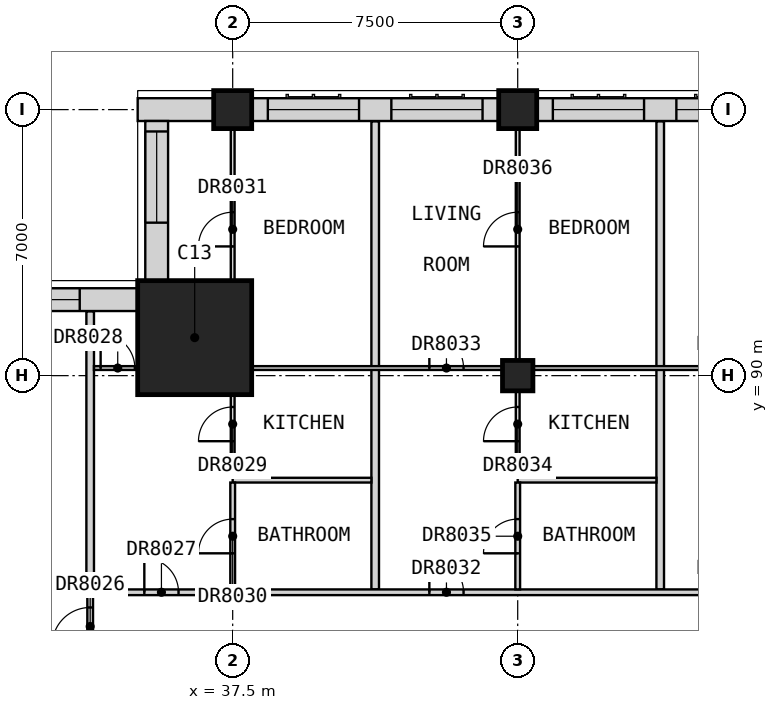
"""IFC4 building model, lengths in metres.
Left out: names, types, materials, properties, quantities, classifications, styles, units other than length and angle.
Written with IfcOpenShell. Run it as: python <this file> out.ifc"""

import sys

from ifc_helpers import new_model, si_unit, direction, frame, frame_2d, origin, origin_2d, place, context, subcontext, project, spatial, rectangle, extrude, element, fill, save


model = new_model("IFC4")
c1 = context("Model", 3, precision=1e-05, world=origin(), true_north=direction((0.0, 1.0)))
c2 = subcontext(c1, "Body", "Model", "MODEL_VIEW")
j1 = project(units=[si_unit("LENGTHUNIT", "METRE"), si_unit("PLANEANGLEUNIT", "RADIAN")], contexts=[c1])
p1 = place(None, origin())
s1 = spatial("IfcSite", under=j1, at=p1, CompositionType="ELEMENT")
p2 = place(p1, origin())
s2 = spatial("IfcBuilding", under=s1, at=p2, CompositionType="ELEMENT")
p3 = place(p2, frame((0.0, 0.0, 233.7)))
s3 = spatial("IfcBuildingStorey", under=s2, at=p3, CompositionType="ELEMENT", Elevation=233.7)
p4 = place(p3, frame((37.5, 97.0, 0.0), z_axis=(0.0, 0.0, 1.0), x_axis=(1.0, 0.0, 0.0)))
e1 = element("IfcColumn", 1, at=p4, inside=s3, PredefinedType="COLUMN", context=c2, shape_type="SweptSolid", body=[
    extrude(rectangle(XDim=1.0, YDim=1.0, at=origin_2d()), origin(), (0.0, 0.0, 1.0), 3.5),
])
p5 = place(p3, frame((45.0, 90.0, 0.0), z_axis=(0.0, 0.0, 1.0), x_axis=(1.0, 0.0, 0.0)))
e2 = element("IfcColumn", 2, at=p5, inside=s3, PredefinedType="COLUMN", context=c2, shape_type="SweptSolid", body=[
    extrude(rectangle(XDim=0.8, YDim=0.8, at=origin_2d()), origin(), (0.0, 0.0, 1.0), 3.5),
])
p6 = place(p3, frame((45.0, 97.0, 0.0), z_axis=(0.0, 0.0, 1.0), x_axis=(1.0, 0.0, 0.0)))
e3 = element("IfcColumn", 3, at=p6, inside=s3, PredefinedType="COLUMN", context=c2, shape_type="SweptSolid", body=[
    extrude(rectangle(XDim=1.0, YDim=1.0, at=origin_2d()), origin(), (0.0, 0.0, 1.0), 3.5),
])
p7 = place(p3, frame((36.5, 91.0, 0.0), z_axis=(0.0, 0.0, 1.0), x_axis=(1.0, 0.0, 0.0)))
e4 = element("IfcColumn", 4, at=p7, inside=s3, PredefinedType="COLUMN", context=c2, shape_type="SweptSolid", body=[
    extrude(rectangle(XDim=3.0, YDim=3.0, at=origin_2d()), origin(), (0.0, 0.0, 1.0), 3.5),
])
p8 = place(p3, frame((52.0, 97.0, 0.0), z_axis=(0.0, 0.0, 1.0), x_axis=(-1.0, 0.0, 0.0)))
e5 = element("IfcWall", 5, at=p8, inside=s3, PredefinedType="SOLIDWALL", context=c2, shape_type="SweptSolid", body=[
    extrude(rectangle(XDim=6.5, YDim=0.6, at=frame_2d((3.25, 0.0))), origin(), (0.0, 0.0, 1.0), 2.75),
])
p9 = place(p8, frame((3.675, 0.0, 0.8)))
e6 = element("IfcOpeningElement", 6, at=p9, cuts=e5, PredefinedType="OPENING", context=c2, shape_type="SweptSolid", body=[
    extrude(rectangle(XDim=2.4, YDim=1.8, at=frame_2d((1.2, 0.9))), frame((0.0, 0.31, 0.0), z_axis=(0.0, -1.0, 0.0), x_axis=(1.0, 0.0, 0.0)), (0.0, 0.0, 1.0), 0.62),
])
p10 = place(p8, frame((0.425, 0.0, 0.8)))
e7 = element("IfcOpeningElement", 7, at=p10, cuts=e5, PredefinedType="OPENING", context=c2, shape_type="SweptSolid", body=[
    extrude(rectangle(XDim=2.4, YDim=1.8, at=frame_2d((1.2, 0.9))), frame((0.0, 0.31, 0.0), z_axis=(0.0, -1.0, 0.0), x_axis=(1.0, 0.0, 0.0)), (0.0, 0.0, 1.0), 0.62),
])
p11 = place(p3, frame((44.5, 97.0, 0.0), z_axis=(0.0, 0.0, 1.0), x_axis=(-1.0, 0.0, 0.0)))
e8 = element("IfcWall", 8, at=p11, inside=s3, PredefinedType="SOLIDWALL", context=c2, shape_type="SweptSolid", body=[
    extrude(rectangle(XDim=6.5, YDim=0.6, at=frame_2d((3.25, 0.0))), origin(), (0.0, 0.0, 1.0), 2.75),
])
p12 = place(p11, frame((3.675, 0.0, 0.8)))
e9 = element("IfcOpeningElement", 9, at=p12, cuts=e8, PredefinedType="OPENING", context=c2, shape_type="SweptSolid", body=[
    extrude(rectangle(XDim=2.4, YDim=1.8, at=frame_2d((1.2, 0.9))), frame((0.0, 0.31, 0.0), z_axis=(0.0, -1.0, 0.0), x_axis=(1.0, 0.0, 0.0)), (0.0, 0.0, 1.0), 0.62),
])
p13 = place(p11, frame((0.425, 0.0, 0.8)))
e10 = element("IfcOpeningElement", 10, at=p13, cuts=e8, PredefinedType="OPENING", context=c2, shape_type="SweptSolid", body=[
    extrude(rectangle(XDim=2.4, YDim=1.8, at=frame_2d((1.2, 0.9))), frame((0.0, 0.31, 0.0), z_axis=(0.0, -1.0, 0.0), x_axis=(1.0, 0.0, 0.0)), (0.0, 0.0, 1.0), 0.62),
])
p14 = place(p3, frame((37.0, 97.0, 0.0), z_axis=(0.0, 0.0, 1.0), x_axis=(-1.0, 0.0, 0.0)))
e11 = element("IfcWall", 11, at=p14, inside=s3, PredefinedType="SOLIDWALL", context=c2, shape_type="SweptSolid", body=[
    extrude(rectangle(XDim=2.0, YDim=0.6, at=frame_2d((1.0, 0.0))), origin(), (0.0, 0.0, 1.0), 3.25),
])
p15 = place(p3, frame((35.5, 96.7, 0.0), z_axis=(0.0, 0.0, 1.0), x_axis=(0.0, -1.0, 0.0)))
e12 = element("IfcWall", 12, at=p15, inside=s3, PredefinedType="SOLIDWALL", context=c2, shape_type="SweptSolid", body=[
    extrude(rectangle(XDim=4.2, YDim=0.6, at=frame_2d((2.1, 0.0))), origin(), (0.0, 0.0, 1.0), 3.25),
])
p16 = place(p15, frame((0.275, 0.0, 0.8)))
e13 = element("IfcOpeningElement", 13, at=p16, cuts=e12, PredefinedType="OPENING", context=c2, shape_type="SweptSolid", body=[
    extrude(rectangle(XDim=2.4, YDim=1.8, at=frame_2d((1.2, 0.9))), frame((0.0, 0.31, 0.0), z_axis=(0.0, -1.0, 0.0), x_axis=(1.0, 0.0, 0.0)), (0.0, 0.0, 1.0), 0.62),
])
p17 = place(p3, frame((35.0, 92.0, 0.0), z_axis=(0.0, 0.0, 1.0), x_axis=(-1.0, 0.0, 0.0)))
e14 = element("IfcWall", 14, at=p17, inside=s3, PredefinedType="SOLIDWALL", context=c2, shape_type="SweptSolid", body=[
    extrude(rectangle(XDim=4.2, YDim=0.6, at=frame_2d((2.1, 0.0))), origin(), (0.0, 0.0, 1.0), 3.25),
])
p18 = place(p17, frame((1.525, 0.0, 0.8)))
e15 = element("IfcOpeningElement", 15, at=p18, cuts=e14, PredefinedType="OPENING", context=c2, shape_type="SweptSolid", body=[
    extrude(rectangle(XDim=2.4, YDim=1.8, at=frame_2d((1.2, 0.9))), frame((0.0, 0.31, 0.0), z_axis=(0.0, -1.0, 0.0), x_axis=(1.0, 0.0, 0.0)), (0.0, 0.0, 1.0), 0.62),
])
p19 = place(p3, frame((33.75, 84.3, 0.0), z_axis=(0.0, 0.0, 1.0), x_axis=(0.0, 1.0, 0.0)))
e16 = element("IfcWall", 16, at=p19, inside=s3, PredefinedType="PARTITIONING", context=c2, shape_type="SweptSolid", body=[
    extrude(rectangle(XDim=7.39, YDim=0.2, at=frame_2d((3.695, 0.0))), origin(), (0.0, 0.0, 1.0), 3.25),
])
for number, where, z_axis, x_axis in (
    (17, (41.25, 84.375, 0.0), (0.0, 0.0, 1.0), (0.0, 1.0, 0.0)),
    (18, (48.75, 84.375, 0.0), (0.0, 0.0, 1.0), (0.0, 1.0, 0.0)),
):
    element("IfcWall", number, at=place(p3, frame(where, z_axis=z_axis, x_axis=x_axis)), inside=s3, PredefinedType="PARTITIONING", context=c2, shape_type="SweptSolid", body=[
        extrude(rectangle(XDim=12.315, YDim=0.2, at=frame_2d((6.157, 0.0))), origin(), (0.0, 0.0, 1.0), 3.25),
    ])
p20 = place(p3, frame((33.85, 84.3, 0.0), z_axis=(0.0, 0.0, 1.0), x_axis=(1.0, 0.0, 0.0)))
e19 = element("IfcWall", 19, at=p20, inside=s3, PredefinedType="PARTITIONING", context=c2, shape_type="SweptSolid", body=[
    extrude(rectangle(XDim=27.95, YDim=0.15, at=frame_2d((13.975, 0.0))), origin(), (0.0, 0.0, 1.0), 3.25),
])
p21 = place(p20, frame((1.325, 0.0, 0.0)))
e20 = element("IfcOpeningElement", 20, at=p21, cuts=e19, PredefinedType="OPENING", context=c2, shape_type="SweptSolid", body=[
    extrude(rectangle(XDim=0.9, YDim=2.1, at=frame_2d((0.45, 1.05))), frame((0.0, 0.085, 0.0), z_axis=(0.0, -1.0, 0.0), x_axis=(1.0, 0.0, 0.0)), (0.0, 0.0, 1.0), 0.17),
])
p22 = place(p20, frame((8.825, 0.0, 0.0)))
e21 = element("IfcOpeningElement", 21, at=p22, cuts=e19, PredefinedType="OPENING", context=c2, shape_type="SweptSolid", body=[
    extrude(rectangle(XDim=0.9, YDim=2.1, at=frame_2d((0.45, 1.05))), frame((0.0, 0.085, 0.0), z_axis=(0.0, -1.0, 0.0), x_axis=(1.0, 0.0, 0.0)), (0.0, 0.0, 1.0), 0.17),
])
p23 = place(p20, frame((16.325, 0.0, 0.0)))
e22 = element("IfcOpeningElement", 22, at=p23, cuts=e19, PredefinedType="OPENING", context=c2, shape_type="SweptSolid", body=[
    extrude(rectangle(XDim=0.9, YDim=2.1, at=frame_2d((0.45, 1.05))), frame((0.0, 0.085, 0.0), z_axis=(0.0, -1.0, 0.0), x_axis=(1.0, 0.0, 0.0)), (0.0, 0.0, 1.0), 0.17),
])
p24 = place(p20, frame((26.55, 0.0, 0.0)))
e23 = element("IfcOpeningElement", 23, at=p24, cuts=e19, PredefinedType="OPENING", context=c2, shape_type="SweptSolid", body=[
    extrude(rectangle(XDim=1.0, YDim=2.1, at=frame_2d((0.5, 1.05))), frame((0.0, 0.085, 0.0), z_axis=(0.0, -1.0, 0.0), x_axis=(1.0, 0.0, 0.0)), (0.0, 0.0, 1.0), 0.17),
])
p25 = place(p3, frame((33.75, 82.5, 0.0), z_axis=(0.0, 0.0, 1.0), x_axis=(0.0, 1.0, 0.0)))
e24 = element("IfcWall", 24, at=p25, inside=s3, PredefinedType="PARTITIONING", context=c2, shape_type="SweptSolid", body=[
    extrude(rectangle(XDim=1.725, YDim=0.15, at=frame_2d((0.863, 0.0))), origin(), (0.0, 0.0, 1.0), 3.25),
])
p26 = place(p25, frame((0.4, 0.0, 0.0)))
e25 = element("IfcOpeningElement", 25, at=p26, cuts=e24, PredefinedType="OPENING", context=c2, shape_type="SweptSolid", body=[
    extrude(rectangle(XDim=1.0, YDim=2.1, at=frame_2d((0.5, 1.05))), frame((0.0, 0.085, 0.0), z_axis=(0.0, -1.0, 0.0), x_axis=(1.0, 0.0, 0.0)), (0.0, 0.0, 1.0), 0.17),
])
p27 = place(p3, frame((33.85, 90.2, 0.0), z_axis=(0.0, 0.0, 1.0), x_axis=(1.0, 0.0, 0.0)))
e26 = element("IfcWall", 26, at=p27, inside=s3, PredefinedType="PARTITIONING", context=c2, shape_type="SweptSolid", body=[
    extrude(rectangle(XDim=26.05, YDim=0.1, at=frame_2d((13.025, 0.0))), origin(), (0.0, 0.0, 1.0), 3.25),
])
p28 = place(p27, frame((0.175, 0.0, 0.0)))
e27 = element("IfcOpeningElement", 27, at=p28, cuts=e26, PredefinedType="OPENING", context=c2, shape_type="SweptSolid", body=[
    extrude(rectangle(XDim=0.9, YDim=2.1, at=frame_2d((0.45, 1.05))), frame((0.0, 0.06, 0.0), z_axis=(0.0, -1.0, 0.0), x_axis=(1.0, 0.0, 0.0)), (0.0, 0.0, 1.0), 0.12),
])
p29 = place(p27, frame((8.825, 0.0, 0.0)))
e28 = element("IfcOpeningElement", 28, at=p29, cuts=e26, PredefinedType="OPENING", context=c2, shape_type="SweptSolid", body=[
    extrude(rectangle(XDim=0.9, YDim=2.1, at=frame_2d((0.45, 1.05))), frame((0.0, 0.06, 0.0), z_axis=(0.0, -1.0, 0.0), x_axis=(1.0, 0.0, 0.0)), (0.0, 0.0, 1.0), 0.12),
])
p30 = place(p27, frame((16.325, 0.0, 0.0)))
e29 = element("IfcOpeningElement", 29, at=p30, cuts=e26, PredefinedType="OPENING", context=c2, shape_type="SweptSolid", body=[
    extrude(rectangle(XDim=0.9, YDim=2.1, at=frame_2d((0.45, 1.05))), frame((0.0, 0.06, 0.0), z_axis=(0.0, -1.0, 0.0), x_axis=(1.0, 0.0, 0.0)), (0.0, 0.0, 1.0), 0.12),
])
p31 = place(p27, frame((23.825, 0.0, 0.0)))
e30 = element("IfcOpeningElement", 30, at=p31, cuts=e26, PredefinedType="OPENING", context=c2, shape_type="SweptSolid", body=[
    extrude(rectangle(XDim=0.9, YDim=2.1, at=frame_2d((0.45, 1.05))), frame((0.0, 0.06, 0.0), z_axis=(0.0, -1.0, 0.0), x_axis=(1.0, 0.0, 0.0)), (0.0, 0.0, 1.0), 0.12),
])
p32 = place(p3, frame((37.5, 87.312, 0.0), z_axis=(0.0, 0.0, 1.0), x_axis=(0.0, 1.0, 0.0)))
e31 = element("IfcWall", 31, at=p32, inside=s3, PredefinedType="PARTITIONING", context=c2, shape_type="SweptSolid", body=[
    extrude(rectangle(XDim=10.188, YDim=0.1, at=frame_2d((5.094, 0.0))), origin(), (0.0, 0.0, 1.0), 2.75),
])
p33 = place(p32, frame((0.962, 0.0, 0.0)))
e32 = element("IfcOpeningElement", 32, at=p33, cuts=e31, PredefinedType="OPENING", context=c2, shape_type="SweptSolid", body=[
    extrude(rectangle(XDim=0.9, YDim=2.1, at=frame_2d((0.45, 1.05))), frame((0.0, 0.06, 0.0), z_axis=(0.0, -1.0, 0.0), x_axis=(1.0, 0.0, 0.0)), (0.0, 0.0, 1.0), 0.12),
])
p34 = place(p32, frame((6.087, 0.0, 0.0)))
e33 = element("IfcOpeningElement", 33, at=p34, cuts=e31, PredefinedType="OPENING", context=c2, shape_type="SweptSolid", body=[
    extrude(rectangle(XDim=0.9, YDim=2.1, at=frame_2d((0.45, 1.05))), frame((0.0, 0.06, 0.0), z_axis=(0.0, -1.0, 0.0), x_axis=(1.0, 0.0, 0.0)), (0.0, 0.0, 1.0), 0.12),
])
p35 = place(p3, frame((45.0, 87.312, 0.0), z_axis=(0.0, 0.0, 1.0), x_axis=(0.0, 1.0, 0.0)))
e34 = element("IfcWall", 34, at=p35, inside=s3, PredefinedType="PARTITIONING", context=c2, shape_type="SweptSolid", body=[
    extrude(rectangle(XDim=10.188, YDim=0.1, at=frame_2d((5.094, 0.0))), origin(), (0.0, 0.0, 1.0), 3.25),
])
p36 = place(p35, frame((0.962, 0.0, 0.0)))
e35 = element("IfcOpeningElement", 35, at=p36, cuts=e34, PredefinedType="OPENING", context=c2, shape_type="SweptSolid", body=[
    extrude(rectangle(XDim=0.9, YDim=2.1, at=frame_2d((0.45, 1.05))), frame((0.0, 0.06, 0.0), z_axis=(0.0, -1.0, 0.0), x_axis=(1.0, 0.0, 0.0)), (0.0, 0.0, 1.0), 0.12),
])
p37 = place(p35, frame((6.087, 0.0, 0.0)))
e36 = element("IfcOpeningElement", 36, at=p37, cuts=e34, PredefinedType="OPENING", context=c2, shape_type="SweptSolid", body=[
    extrude(rectangle(XDim=0.9, YDim=2.1, at=frame_2d((0.45, 1.05))), frame((0.0, 0.06, 0.0), z_axis=(0.0, -1.0, 0.0), x_axis=(1.0, 0.0, 0.0)), (0.0, 0.0, 1.0), 0.12),
])
for number, where, z_axis, x_axis in (
    (37, (37.5, 87.25, 0.0), (0.0, 0.0, 1.0), (1.0, 0.0, 0.0)),
    (38, (45.0, 87.25, 0.0), (0.0, 0.0, 1.0), (1.0, 0.0, 0.0)),
):
    element("IfcWall", number, at=place(p3, frame(where, z_axis=z_axis, x_axis=x_axis)), inside=s3, PredefinedType="PARTITIONING", context=c2, shape_type="SweptSolid", body=[
        extrude(rectangle(XDim=3.65, YDim=0.125, at=frame_2d((1.825, 0.0))), origin(), (0.0, 0.0, 1.0), 3.25),
    ])
p38 = place(p3, frame((37.5, 84.375, 0.0), z_axis=(0.0, 0.0, 1.0), x_axis=(0.0, 1.0, 0.0)))
e39 = element("IfcWall", 39, at=p38, inside=s3, PredefinedType="PARTITIONING", context=c2, shape_type="SweptSolid", body=[
    extrude(rectangle(XDim=2.812, YDim=0.125, at=frame_2d((1.406, 0.0))), origin(), (0.0, 0.0, 1.0), 3.25),
])
p39 = place(p38, frame((0.95, 0.0, 0.0)))
e40 = element("IfcOpeningElement", 40, at=p39, cuts=e39, PredefinedType="OPENING", context=c2, shape_type="SweptSolid", body=[
    extrude(rectangle(XDim=0.9, YDim=2.1, at=frame_2d((0.45, 1.05))), frame((0.0, 0.073, 0.0), z_axis=(0.0, -1.0, 0.0), x_axis=(1.0, 0.0, 0.0)), (0.0, 0.0, 1.0), 0.145),
])
p40 = place(p3, frame((45.0, 84.375, 0.0), z_axis=(0.0, 0.0, 1.0), x_axis=(0.0, 1.0, 0.0)))
e41 = element("IfcWall", 41, at=p40, inside=s3, PredefinedType="PARTITIONING", context=c2, shape_type="SweptSolid", body=[
    extrude(rectangle(XDim=2.812, YDim=0.125, at=frame_2d((1.406, 0.0))), origin(), (0.0, 0.0, 1.0), 3.25),
])
p41 = place(p40, frame((0.95, 0.0, 0.0)))
e42 = element("IfcOpeningElement", 42, at=p41, cuts=e41, PredefinedType="OPENING", context=c2, shape_type="SweptSolid", body=[
    extrude(rectangle(XDim=0.9, YDim=2.1, at=frame_2d((0.45, 1.05))), frame((0.0, 0.073, 0.0), z_axis=(0.0, -1.0, 0.0), x_axis=(1.0, 0.0, 0.0)), (0.0, 0.0, 1.0), 0.145),
])
p42 = place(p9, origin())
e43 = element("IfcWindow", 43, at=p42, inside=s3, PartitioningType="SINGLE_PANEL", PredefinedType="WINDOW", context=c2, shape_type="SweptSolid", body=[
    extrude(rectangle(XDim=2.4, YDim=1.8, at=frame_2d((1.2, 0.9))), frame((0.0, -0.07, 0.0), z_axis=(0.0, -1.0, 0.0), x_axis=(1.0, 0.0, 0.0)), (0.0, 0.0, 1.0), 0.06),
])
fill(e6, e43)
p43 = place(p10, origin())
e44 = element("IfcWindow", 44, at=p43, inside=s3, PartitioningType="SINGLE_PANEL", PredefinedType="WINDOW", context=c2, shape_type="SweptSolid", body=[
    extrude(rectangle(XDim=2.4, YDim=1.8, at=frame_2d((1.2, 0.9))), frame((0.0, -0.07, 0.0), z_axis=(0.0, -1.0, 0.0), x_axis=(1.0, 0.0, 0.0)), (0.0, 0.0, 1.0), 0.06),
])
fill(e7, e44)
p44 = place(p12, origin())
e45 = element("IfcWindow", 45, at=p44, inside=s3, PartitioningType="SINGLE_PANEL", PredefinedType="WINDOW", context=c2, shape_type="SweptSolid", body=[
    extrude(rectangle(XDim=2.4, YDim=1.8, at=frame_2d((1.2, 0.9))), frame((0.0, -0.07, 0.0), z_axis=(0.0, -1.0, 0.0), x_axis=(1.0, 0.0, 0.0)), (0.0, 0.0, 1.0), 0.06),
])
fill(e9, e45)
p45 = place(p13, origin())
e46 = element("IfcWindow", 46, at=p45, inside=s3, PartitioningType="SINGLE_PANEL", PredefinedType="WINDOW", context=c2, shape_type="SweptSolid", body=[
    extrude(rectangle(XDim=2.4, YDim=1.8, at=frame_2d((1.2, 0.9))), frame((0.0, -0.07, 0.0), z_axis=(0.0, -1.0, 0.0), x_axis=(1.0, 0.0, 0.0)), (0.0, 0.0, 1.0), 0.06),
])
fill(e10, e46)
p46 = place(p16, origin())
e47 = element("IfcWindow", 47, at=p46, inside=s3, PartitioningType="SINGLE_PANEL", PredefinedType="WINDOW", context=c2, shape_type="SweptSolid", body=[
    extrude(rectangle(XDim=2.4, YDim=1.8, at=frame_2d((1.2, 0.9))), frame((0.0, -0.07, 0.0), z_axis=(0.0, -1.0, 0.0), x_axis=(1.0, 0.0, 0.0)), (0.0, 0.0, 1.0), 0.06),
])
fill(e13, e47)
p47 = place(p18, origin())
e48 = element("IfcWindow", 48, at=p47, inside=s3, PartitioningType="SINGLE_PANEL", PredefinedType="WINDOW", context=c2, shape_type="SweptSolid", body=[
    extrude(rectangle(XDim=2.4, YDim=1.8, at=frame_2d((1.2, 0.9))), frame((0.0, -0.07, 0.0), z_axis=(0.0, -1.0, 0.0), x_axis=(1.0, 0.0, 0.0)), (0.0, 0.0, 1.0), 0.06),
])
fill(e15, e48)
p48 = place(p26, origin())
e49 = element("IfcDoor", 49, at=p48, inside=s3, OperationType="SINGLE_SWING_LEFT", PredefinedType="DOOR", context=c2, shape_type="SweptSolid", body=[
    extrude(rectangle(XDim=1.0, YDim=2.1, at=frame_2d((0.5, 1.05))), frame((0.0, 0.025, 0.0), z_axis=(0.0, -1.0, 0.0), x_axis=(1.0, 0.0, 0.0)), (0.0, 0.0, 1.0), 0.05),
])
fill(e25, e49)
p49 = place(p21, origin())
e50 = element("IfcDoor", 50, at=p49, inside=s3, OperationType="SINGLE_SWING_LEFT", PredefinedType="DOOR", context=c2, shape_type="SweptSolid", body=[
    extrude(rectangle(XDim=0.9, YDim=2.1, at=frame_2d((0.45, 1.05))), frame((0.0, 0.025, 0.0), z_axis=(0.0, -1.0, 0.0), x_axis=(1.0, 0.0, 0.0)), (0.0, 0.0, 1.0), 0.05),
])
fill(e20, e50)
p50 = place(p28, origin())
e51 = element("IfcDoor", 51, at=p50, inside=s3, OperationType="SINGLE_SWING_RIGHT", PredefinedType="DOOR", context=c2, shape_type="SweptSolid", body=[
    extrude(rectangle(XDim=0.9, YDim=2.1, at=frame_2d((0.45, 1.05))), frame((0.0, 0.025, 0.0), z_axis=(0.0, -1.0, 0.0), x_axis=(1.0, 0.0, 0.0)), (0.0, 0.0, 1.0), 0.05),
])
fill(e27, e51)
p51 = place(p33, origin())
e52 = element("IfcDoor", 52, at=p51, inside=s3, OperationType="SINGLE_SWING_RIGHT", PredefinedType="DOOR", context=c2, shape_type="SweptSolid", body=[
    extrude(rectangle(XDim=0.9, YDim=2.1, at=frame_2d((0.45, 1.05))), frame((0.0, 0.025, 0.0), z_axis=(0.0, -1.0, 0.0), x_axis=(1.0, 0.0, 0.0)), (0.0, 0.0, 1.0), 0.05),
])
fill(e32, e52)
p52 = place(p39, origin())
e53 = element("IfcDoor", 53, at=p52, inside=s3, OperationType="SINGLE_SWING_RIGHT", PredefinedType="DOOR", context=c2, shape_type="SweptSolid", body=[
    extrude(rectangle(XDim=0.9, YDim=2.1, at=frame_2d((0.45, 1.05))), frame((0.0, 0.025, 0.0), z_axis=(0.0, -1.0, 0.0), x_axis=(1.0, 0.0, 0.0)), (0.0, 0.0, 1.0), 0.05),
])
fill(e40, e53)
p53 = place(p34, origin())
e54 = element("IfcDoor", 54, at=p53, inside=s3, OperationType="SINGLE_SWING_LEFT", PredefinedType="DOOR", context=c2, shape_type="SweptSolid", body=[
    extrude(rectangle(XDim=0.9, YDim=2.1, at=frame_2d((0.45, 1.05))), frame((0.0, 0.025, 0.0), z_axis=(0.0, -1.0, 0.0), x_axis=(1.0, 0.0, 0.0)), (0.0, 0.0, 1.0), 0.05),
])
fill(e33, e54)
p54 = place(p22, origin())
e55 = element("IfcDoor", 55, at=p54, inside=s3, OperationType="SINGLE_SWING_LEFT", PredefinedType="DOOR", context=c2, shape_type="SweptSolid", body=[
    extrude(rectangle(XDim=0.9, YDim=2.1, at=frame_2d((0.45, 1.05))), frame((0.0, 0.025, 0.0), z_axis=(0.0, -1.0, 0.0), x_axis=(1.0, 0.0, 0.0)), (0.0, 0.0, 1.0), 0.05),
])
fill(e21, e55)
p55 = place(p29, origin())
e56 = element("IfcDoor", 56, at=p55, inside=s3, OperationType="SINGLE_SWING_RIGHT", PredefinedType="DOOR", context=c2, shape_type="SweptSolid", body=[
    extrude(rectangle(XDim=0.9, YDim=2.1, at=frame_2d((0.45, 1.05))), frame((0.0, 0.025, 0.0), z_axis=(0.0, -1.0, 0.0), x_axis=(1.0, 0.0, 0.0)), (0.0, 0.0, 1.0), 0.05),
])
fill(e28, e56)
p56 = place(p36, origin())
e57 = element("IfcDoor", 57, at=p56, inside=s3, OperationType="SINGLE_SWING_RIGHT", PredefinedType="DOOR", context=c2, shape_type="SweptSolid", body=[
    extrude(rectangle(XDim=0.9, YDim=2.1, at=frame_2d((0.45, 1.05))), frame((0.0, 0.025, 0.0), z_axis=(0.0, -1.0, 0.0), x_axis=(1.0, 0.0, 0.0)), (0.0, 0.0, 1.0), 0.05),
])
fill(e35, e57)
p57 = place(p41, origin())
e58 = element("IfcDoor", 58, at=p57, inside=s3, OperationType="SINGLE_SWING_RIGHT", PredefinedType="DOOR", context=c2, shape_type="SweptSolid", body=[
    extrude(rectangle(XDim=0.9, YDim=2.1, at=frame_2d((0.45, 1.05))), frame((0.0, 0.025, 0.0), z_axis=(0.0, -1.0, 0.0), x_axis=(1.0, 0.0, 0.0)), (0.0, 0.0, 1.0), 0.05),
])
fill(e42, e58)
p58 = place(p37, origin())
e59 = element("IfcDoor", 59, at=p58, inside=s3, OperationType="SINGLE_SWING_LEFT", PredefinedType="DOOR", context=c2, shape_type="SweptSolid", body=[
    extrude(rectangle(XDim=0.9, YDim=2.1, at=frame_2d((0.45, 1.05))), frame((0.0, 0.025, 0.0), z_axis=(0.0, -1.0, 0.0), x_axis=(1.0, 0.0, 0.0)), (0.0, 0.0, 1.0), 0.05),
])
fill(e36, e59)
save(model, sys.argv[1])
